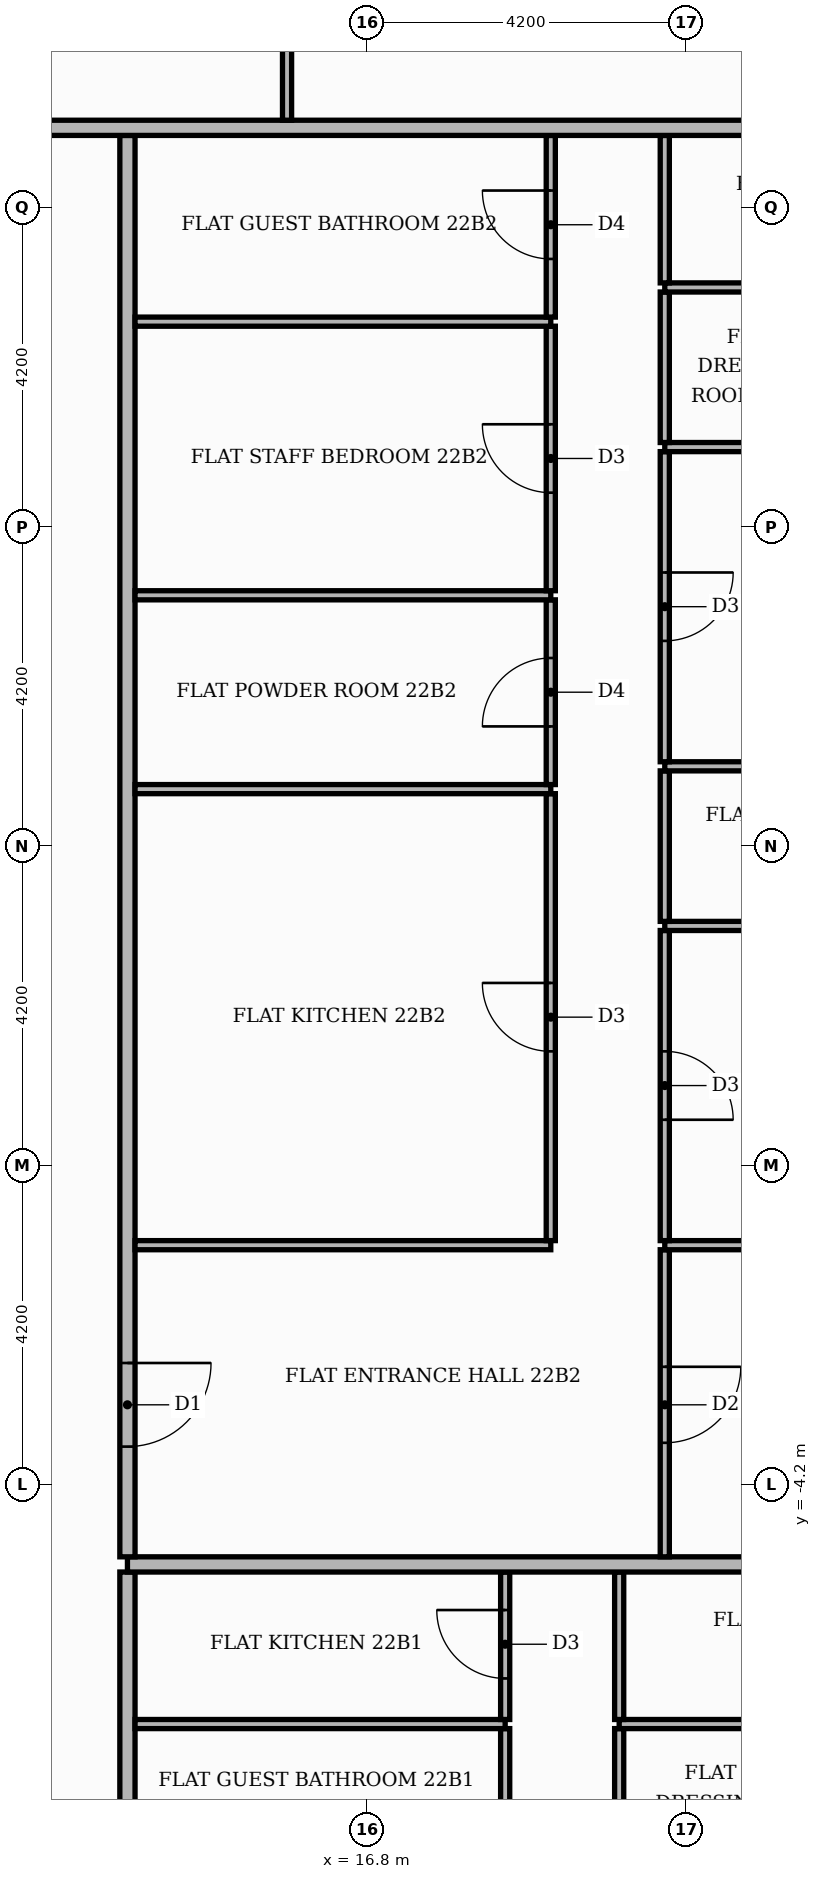
"""IFC4 building model, lengths in metres.
Left out: names, types, materials, properties, quantities, classifications, styles, units other than length and angle.
Written with IfcOpenShell. Run it as: python <this file> out.ifc"""

import sys

from ifc_helpers import new_model, si_unit, direction, frame, frame_2d, origin, place, context, subcontext, project, spatial, rectangle, extrude, element, fill, save


model = new_model("IFC4")
c1 = context("Model", 3, precision=1e-05, world=origin(), true_north=direction((0.0, 1.0)))
c2 = subcontext(c1, "Body", "Model", "MODEL_VIEW")
j1 = project(units=[si_unit("LENGTHUNIT", "METRE"), si_unit("PLANEANGLEUNIT", "RADIAN")], contexts=[c1])
p1 = place(None, origin())
s1 = spatial("IfcSite", under=j1, at=p1, CompositionType="ELEMENT")
p2 = place(p1, origin())
s2 = spatial("IfcBuilding", under=s1, at=p2, CompositionType="ELEMENT")
p3 = place(p2, frame((0.0, 0.0, 94.8)))
s3 = spatial("IfcBuildingStorey", under=s2, at=p3, CompositionType="ELEMENT", Elevation=94.8)
p4 = place(p3, frame((13.65, -13.55, 0.0), z_axis=(0.0, 0.0, 1.0), x_axis=(0.0, 1.0, 0.0)))
e1 = element("IfcWall", 1, at=p4, inside=s3, PredefinedType="PARTITIONING", context=c2, shape_type="SweptSolid", body=[
    extrude(rectangle(XDim=8.2, YDim=0.2, at=frame_2d((4.1, 0.0))), origin(), (0.0, 0.0, 1.0), 3.48),
])
p5 = place(p4, frame((1.45, 0.0, 0.0)))
e2 = element("IfcOpeningElement", 2, at=p5, cuts=e1, PredefinedType="OPENING", context=c2, shape_type="SweptSolid", body=[
    extrude(rectangle(XDim=1.1, YDim=2.4, at=frame_2d((0.55, 1.2))), frame((0.0, 0.11, 0.0), z_axis=(0.0, -1.0, 0.0), x_axis=(1.0, 0.0, 0.0)), (0.0, 0.0, 1.0), 0.22),
])
for number, where, z_axis, x_axis in (
    (3, (18.62, -9.39, 0.0), (0.0, 0.0, 1.0), (0.0, 1.0, 0.0)),
    (4, (20.12, -9.39, 0.0), (0.0, 0.0, 1.0), (0.0, 1.0, 0.0)),
):
    element("IfcWall", number, at=place(p3, frame(where, z_axis=z_axis, x_axis=x_axis)), inside=s3, PredefinedType="PARTITIONING", context=c2, shape_type="SweptSolid", body=[
        extrude(rectangle(XDim=1.98, YDim=0.12, at=frame_2d((0.99, 0.0))), origin(), (0.0, 0.0, 1.0), 3.48),
    ])
p6 = place(p3, frame((13.75, -7.35, 0.0), z_axis=(0.0, 0.0, 1.0), x_axis=(1.0, 0.0, 0.0)))
e5 = element("IfcWall", 5, at=p6, inside=s3, PredefinedType="PARTITIONING", context=c2, shape_type="SweptSolid", body=[
    extrude(rectangle(XDim=4.87, YDim=0.12, at=frame_2d((2.435, 0.0))), origin(), (0.0, 0.0, 1.0), 3.48),
])
p7 = place(p3, frame((20.12, -7.35, 0.0), z_axis=(0.0, 0.0, 1.0), x_axis=(1.0, 0.0, 0.0)))
e6 = element("IfcWall", 6, at=p7, inside=s3, PredefinedType="PARTITIONING", context=c2, shape_type="SweptSolid", body=[
    extrude(rectangle(XDim=5.3, YDim=0.12, at=frame_2d((2.65, 0.0))), origin(), (0.0, 0.0, 1.0), 3.48),
])
p8 = place(p7, frame((2.35, 0.0, 0.0)))
e7 = element("IfcOpeningElement", 7, at=p8, cuts=e6, PredefinedType="OPENING", context=c2, shape_type="SweptSolid", body=[
    extrude(rectangle(XDim=0.9, YDim=2.1, at=frame_2d((0.45, 1.05))), frame((0.0, 0.07, 0.0), z_axis=(0.0, -1.0, 0.0), x_axis=(1.0, 0.0, 0.0)), (0.0, 0.0, 1.0), 0.14),
])
p9 = place(p3, frame((18.62, -7.29, 0.0), z_axis=(0.0, 0.0, 1.0), x_axis=(0.0, 1.0, 0.0)))
e8 = element("IfcWall", 8, at=p9, inside=s3, PredefinedType="PARTITIONING", context=c2, shape_type="SweptSolid", body=[
    extrude(rectangle(XDim=1.94, YDim=0.12, at=frame_2d((0.97, 0.0))), origin(), (0.0, 0.0, 1.0), 3.48),
])
p10 = place(p9, frame((0.54, 0.0, 0.0)))
e9 = element("IfcOpeningElement", 9, at=p10, cuts=e8, PredefinedType="OPENING", context=c2, shape_type="SweptSolid", body=[
    extrude(rectangle(XDim=0.9, YDim=2.1, at=frame_2d((0.45, 1.05))), frame((0.0, 0.07, 0.0), z_axis=(0.0, -1.0, 0.0), x_axis=(1.0, 0.0, 0.0)), (0.0, 0.0, 1.0), 0.14),
])
p11 = place(p3, frame((20.12, -7.29, 0.0), z_axis=(0.0, 0.0, 1.0), x_axis=(0.0, 1.0, 0.0)))
e10 = element("IfcWall", 10, at=p11, inside=s3, PredefinedType="PARTITIONING", context=c2, shape_type="SweptSolid", body=[
    extrude(rectangle(XDim=1.94, YDim=0.12, at=frame_2d((0.97, 0.0))), origin(), (0.0, 0.0, 1.0), 3.48),
])
p12 = place(p3, frame((13.65, -5.25, 0.0), z_axis=(0.0, 0.0, 1.0), x_axis=(1.0, 0.0, 0.0)))
e11 = element("IfcWall", 11, at=p12, inside=s3, PredefinedType="PARTITIONING", context=c2, shape_type="SweptSolid", body=[
    extrude(rectangle(XDim=11.77, YDim=0.2, at=frame_2d((5.885, 0.0))), origin(), (0.0, 0.0, 1.0), 3.48),
])
p13 = place(p3, frame((13.65, -5.15, 0.0), z_axis=(0.0, 0.0, 1.0), x_axis=(0.0, 1.0, 0.0)))
e12 = element("IfcWall", 12, at=p13, inside=s3, PredefinedType="PARTITIONING", context=c2, shape_type="SweptSolid", body=[
    extrude(rectangle(XDim=18.7, YDim=0.2, at=frame_2d((9.35, 0.0))), origin(), (0.0, 0.0, 1.0), 3.48),
])
p14 = place(p13, frame((1.45, 0.0, 0.0)))
e13 = element("IfcOpeningElement", 13, at=p14, cuts=e12, PredefinedType="OPENING", context=c2, shape_type="SweptSolid", body=[
    extrude(rectangle(XDim=1.1, YDim=2.4, at=frame_2d((0.55, 1.2))), frame((0.0, 0.11, 0.0), z_axis=(0.0, -1.0, 0.0), x_axis=(1.0, 0.0, 0.0)), (0.0, 0.0, 1.0), 0.22),
])
p15 = place(p3, frame((20.72, -5.15, 0.0), z_axis=(0.0, 0.0, 1.0), x_axis=(0.0, 1.0, 0.0)))
e14 = element("IfcWall", 14, at=p15, inside=s3, PredefinedType="PARTITIONING", context=c2, shape_type="SweptSolid", body=[
    extrude(rectangle(XDim=4.04, YDim=0.12, at=frame_2d((2.02, 0.0))), origin(), (0.0, 0.0, 1.0), 3.48),
])
p16 = place(p15, frame((1.5, 0.0, 0.0)))
e15 = element("IfcOpeningElement", 15, at=p16, cuts=e14, PredefinedType="OPENING", context=c2, shape_type="SweptSolid", body=[
    extrude(rectangle(XDim=1.0, YDim=2.1, at=frame_2d((0.5, 1.05))), frame((0.0, 0.07, 0.0), z_axis=(0.0, -1.0, 0.0), x_axis=(1.0, 0.0, 0.0)), (0.0, 0.0, 1.0), 0.14),
])
p17 = place(p3, frame((13.75, -1.05, 0.0), z_axis=(0.0, 0.0, 1.0), x_axis=(1.0, 0.0, 0.0)))
e16 = element("IfcWall", 16, at=p17, inside=s3, PredefinedType="PARTITIONING", context=c2, shape_type="SweptSolid", body=[
    extrude(rectangle(XDim=5.47, YDim=0.12, at=frame_2d((2.735, 0.0))), origin(), (0.0, 0.0, 1.0), 3.48),
])
p18 = place(p3, frame((20.72, -1.05, 0.0), z_axis=(0.0, 0.0, 1.0), x_axis=(1.0, 0.0, 0.0)))
e17 = element("IfcWall", 17, at=p18, inside=s3, PredefinedType="PARTITIONING", context=c2, shape_type="SweptSolid", body=[
    extrude(rectangle(XDim=4.7, YDim=0.12, at=frame_2d((2.35, 0.0))), origin(), (0.0, 0.0, 1.0), 3.48),
])
p19 = place(p3, frame((19.22, -0.99, 0.0), z_axis=(0.0, 0.0, 1.0), x_axis=(0.0, 1.0, 0.0)))
e18 = element("IfcWall", 18, at=p19, inside=s3, PredefinedType="PARTITIONING", context=c2, shape_type="SweptSolid", body=[
    extrude(rectangle(XDim=5.88, YDim=0.12, at=frame_2d((2.94, 0.0))), origin(), (0.0, 0.0, 1.0), 3.48),
])
p20 = place(p19, frame((2.49, 0.0, 0.0)))
e19 = element("IfcOpeningElement", 19, at=p20, cuts=e18, PredefinedType="OPENING", context=c2, shape_type="SweptSolid", body=[
    extrude(rectangle(XDim=0.9, YDim=2.1, at=frame_2d((0.45, 1.05))), frame((0.0, 0.07, 0.0), z_axis=(0.0, -1.0, 0.0), x_axis=(1.0, 0.0, 0.0)), (0.0, 0.0, 1.0), 0.14),
])
p21 = place(p3, frame((20.72, -0.99, 0.0), z_axis=(0.0, 0.0, 1.0), x_axis=(0.0, 1.0, 0.0)))
e20 = element("IfcWall", 20, at=p21, inside=s3, PredefinedType="PARTITIONING", context=c2, shape_type="SweptSolid", body=[
    extrude(rectangle(XDim=4.08, YDim=0.12, at=frame_2d((2.04, 0.0))), origin(), (0.0, 0.0, 1.0), 3.48),
])
p22 = place(p21, frame((1.59, 0.0, 0.0)))
e21 = element("IfcOpeningElement", 21, at=p22, cuts=e20, PredefinedType="OPENING", context=c2, shape_type="SweptSolid", body=[
    extrude(rectangle(XDim=0.9, YDim=2.1, at=frame_2d((0.45, 1.05))), frame((0.0, 0.07, 0.0), z_axis=(0.0, -1.0, 0.0), x_axis=(1.0, 0.0, 0.0)), (0.0, 0.0, 1.0), 0.14),
])
p23 = place(p3, frame((20.72, 3.15, 0.0), z_axis=(0.0, 0.0, 1.0), x_axis=(1.0, 0.0, 0.0)))
e22 = element("IfcWall", 22, at=p23, inside=s3, PredefinedType="PARTITIONING", context=c2, shape_type="SweptSolid", body=[
    extrude(rectangle(XDim=4.7, YDim=0.12, at=frame_2d((2.35, 0.0))), origin(), (0.0, 0.0, 1.0), 3.48),
])
p24 = place(p23, frame((2.05, 0.0, 0.0)))
e23 = element("IfcOpeningElement", 23, at=p24, cuts=e22, PredefinedType="OPENING", context=c2, shape_type="SweptSolid", body=[
    extrude(rectangle(XDim=0.9, YDim=2.1, at=frame_2d((0.45, 1.05))), frame((0.0, 0.07, 0.0), z_axis=(0.0, -1.0, 0.0), x_axis=(1.0, 0.0, 0.0)), (0.0, 0.0, 1.0), 0.14),
])
p25 = place(p3, frame((20.72, 3.21, 0.0), z_axis=(0.0, 0.0, 1.0), x_axis=(0.0, 1.0, 0.0)))
e24 = element("IfcWall", 24, at=p25, inside=s3, PredefinedType="PARTITIONING", context=c2, shape_type="SweptSolid", body=[
    extrude(rectangle(XDim=1.98, YDim=0.12, at=frame_2d((0.99, 0.0))), origin(), (0.0, 0.0, 1.0), 3.48),
])
p26 = place(p3, frame((13.75, 4.95, 0.0), z_axis=(0.0, 0.0, 1.0), x_axis=(1.0, 0.0, 0.0)))
e25 = element("IfcWall", 25, at=p26, inside=s3, PredefinedType="PARTITIONING", context=c2, shape_type="SweptSolid", body=[
    extrude(rectangle(XDim=5.47, YDim=0.12, at=frame_2d((2.735, 0.0))), origin(), (0.0, 0.0, 1.0), 3.48),
])
p27 = place(p3, frame((19.22, 5.01, 0.0), z_axis=(0.0, 0.0, 1.0), x_axis=(0.0, 1.0, 0.0)))
e26 = element("IfcWall", 26, at=p27, inside=s3, PredefinedType="PARTITIONING", context=c2, shape_type="SweptSolid", body=[
    extrude(rectangle(XDim=2.43, YDim=0.12, at=frame_2d((1.215, 0.0))), origin(), (0.0, 0.0, 1.0), 3.48),
])
p28 = place(p27, frame((0.765, 0.0, 0.0)))
e27 = element("IfcOpeningElement", 27, at=p28, cuts=e26, PredefinedType="OPENING", context=c2, shape_type="SweptSolid", body=[
    extrude(rectangle(XDim=0.9, YDim=2.1, at=frame_2d((0.45, 1.05))), frame((0.0, 0.07, 0.0), z_axis=(0.0, -1.0, 0.0), x_axis=(1.0, 0.0, 0.0)), (0.0, 0.0, 1.0), 0.14),
])
p29 = place(p3, frame((20.72, 5.25, 0.0), z_axis=(0.0, 0.0, 1.0), x_axis=(1.0, 0.0, 0.0)))
e28 = element("IfcWall", 28, at=p29, inside=s3, PredefinedType="PARTITIONING", context=c2, shape_type="SweptSolid", body=[
    extrude(rectangle(XDim=4.7, YDim=0.12, at=frame_2d((2.35, 0.0))), origin(), (0.0, 0.0, 1.0), 3.48),
])
p30 = place(p3, frame((20.72, 5.31, 0.0), z_axis=(0.0, 0.0, 1.0), x_axis=(0.0, 1.0, 0.0)))
e29 = element("IfcWall", 29, at=p30, inside=s3, PredefinedType="PARTITIONING", context=c2, shape_type="SweptSolid", body=[
    extrude(rectangle(XDim=4.08, YDim=0.12, at=frame_2d((2.04, 0.0))), origin(), (0.0, 0.0, 1.0), 3.48),
])
p31 = place(p30, frame((1.59, 0.0, 0.0)))
e30 = element("IfcOpeningElement", 30, at=p31, cuts=e29, PredefinedType="OPENING", context=c2, shape_type="SweptSolid", body=[
    extrude(rectangle(XDim=0.9, YDim=2.1, at=frame_2d((0.45, 1.05))), frame((0.0, 0.07, 0.0), z_axis=(0.0, -1.0, 0.0), x_axis=(1.0, 0.0, 0.0)), (0.0, 0.0, 1.0), 0.14),
])
p32 = place(p3, frame((13.75, 7.5, 0.0), z_axis=(0.0, 0.0, 1.0), x_axis=(1.0, 0.0, 0.0)))
e31 = element("IfcWall", 31, at=p32, inside=s3, PredefinedType="PARTITIONING", context=c2, shape_type="SweptSolid", body=[
    extrude(rectangle(XDim=5.47, YDim=0.12, at=frame_2d((2.735, 0.0))), origin(), (0.0, 0.0, 1.0), 3.48),
])
p33 = place(p3, frame((19.22, 7.56, 0.0), z_axis=(0.0, 0.0, 1.0), x_axis=(0.0, 1.0, 0.0)))
e32 = element("IfcWall", 32, at=p33, inside=s3, PredefinedType="PARTITIONING", context=c2, shape_type="SweptSolid", body=[
    extrude(rectangle(XDim=3.48, YDim=0.12, at=frame_2d((1.74, 0.0))), origin(), (0.0, 0.0, 1.0), 3.48),
])
p34 = place(p33, frame((1.29, 0.0, 0.0)))
e33 = element("IfcOpeningElement", 33, at=p34, cuts=e32, PredefinedType="OPENING", context=c2, shape_type="SweptSolid", body=[
    extrude(rectangle(XDim=0.9, YDim=2.1, at=frame_2d((0.45, 1.05))), frame((0.0, 0.07, 0.0), z_axis=(0.0, -1.0, 0.0), x_axis=(1.0, 0.0, 0.0)), (0.0, 0.0, 1.0), 0.14),
])
p35 = place(p3, frame((20.72, 9.45, 0.0), z_axis=(0.0, 0.0, 1.0), x_axis=(1.0, 0.0, 0.0)))
e34 = element("IfcWall", 34, at=p35, inside=s3, PredefinedType="PARTITIONING", context=c2, shape_type="SweptSolid", body=[
    extrude(rectangle(XDim=4.7, YDim=0.12, at=frame_2d((2.35, 0.0))), origin(), (0.0, 0.0, 1.0), 3.48),
])
p36 = place(p35, frame((2.05, 0.0, 0.0)))
e35 = element("IfcOpeningElement", 35, at=p36, cuts=e34, PredefinedType="OPENING", context=c2, shape_type="SweptSolid", body=[
    extrude(rectangle(XDim=0.9, YDim=2.1, at=frame_2d((0.45, 1.05))), frame((0.0, 0.07, 0.0), z_axis=(0.0, -1.0, 0.0), x_axis=(1.0, 0.0, 0.0)), (0.0, 0.0, 1.0), 0.14),
])
p37 = place(p3, frame((20.72, 9.51, 0.0), z_axis=(0.0, 0.0, 1.0), x_axis=(0.0, 1.0, 0.0)))
e36 = element("IfcWall", 36, at=p37, inside=s3, PredefinedType="PARTITIONING", context=c2, shape_type="SweptSolid", body=[
    extrude(rectangle(XDim=1.98, YDim=0.12, at=frame_2d((0.99, 0.0))), origin(), (0.0, 0.0, 1.0), 3.48),
])
p38 = place(p3, frame((13.75, 11.1, 0.0), z_axis=(0.0, 0.0, 1.0), x_axis=(1.0, 0.0, 0.0)))
e37 = element("IfcWall", 37, at=p38, inside=s3, PredefinedType="PARTITIONING", context=c2, shape_type="SweptSolid", body=[
    extrude(rectangle(XDim=5.47, YDim=0.12, at=frame_2d((2.735, 0.0))), origin(), (0.0, 0.0, 1.0), 3.48),
])
p39 = place(p3, frame((19.22, 11.16, 0.0), z_axis=(0.0, 0.0, 1.0), x_axis=(0.0, 1.0, 0.0)))
e38 = element("IfcWall", 38, at=p39, inside=s3, PredefinedType="PARTITIONING", context=c2, shape_type="SweptSolid", body=[
    extrude(rectangle(XDim=2.39, YDim=0.12, at=frame_2d((1.195, 0.0))), origin(), (0.0, 0.0, 1.0), 3.48),
])
p40 = place(p39, frame((0.765, 0.0, 0.0)))
e39 = element("IfcOpeningElement", 39, at=p40, cuts=e38, PredefinedType="OPENING", context=c2, shape_type="SweptSolid", body=[
    extrude(rectangle(XDim=0.9, YDim=2.1, at=frame_2d((0.45, 1.05))), frame((0.0, 0.07, 0.0), z_axis=(0.0, -1.0, 0.0), x_axis=(1.0, 0.0, 0.0)), (0.0, 0.0, 1.0), 0.14),
])
p41 = place(p3, frame((20.72, 11.55, 0.0), z_axis=(0.0, 0.0, 1.0), x_axis=(1.0, 0.0, 0.0)))
e40 = element("IfcWall", 40, at=p41, inside=s3, PredefinedType="PARTITIONING", context=c2, shape_type="SweptSolid", body=[
    extrude(rectangle(XDim=4.7, YDim=0.12, at=frame_2d((2.35, 0.0))), origin(), (0.0, 0.0, 1.0), 3.48),
])
p42 = place(p41, frame((2.05, 0.0, 0.0)))
e41 = element("IfcOpeningElement", 41, at=p42, cuts=e40, PredefinedType="OPENING", context=c2, shape_type="SweptSolid", body=[
    extrude(rectangle(XDim=0.9, YDim=2.1, at=frame_2d((0.45, 1.05))), frame((0.0, 0.07, 0.0), z_axis=(0.0, -1.0, 0.0), x_axis=(1.0, 0.0, 0.0)), (0.0, 0.0, 1.0), 0.14),
])
p43 = place(p3, frame((20.72, 11.61, 0.0), z_axis=(0.0, 0.0, 1.0), x_axis=(0.0, 1.0, 0.0)))
e42 = element("IfcWall", 42, at=p43, inside=s3, PredefinedType="PARTITIONING", context=c2, shape_type="SweptSolid", body=[
    extrude(rectangle(XDim=1.94, YDim=0.12, at=frame_2d((0.97, 0.0))), origin(), (0.0, 0.0, 1.0), 3.48),
])
p44 = place(p3, frame((-13.65, 13.65, 0.0), z_axis=(0.0, 0.0, 1.0), x_axis=(1.0, 0.0, 0.0)))
e43 = element("IfcWall", 43, at=p44, inside=s3, PredefinedType="PARTITIONING", context=c2, shape_type="SweptSolid", body=[
    extrude(rectangle(XDim=39.07, YDim=0.2, at=frame_2d((19.535, 0.0))), origin(), (0.0, 0.0, 1.0), 3.48),
])
p45 = place(p44, frame((24.65, 0.0, 0.0)))
e44 = element("IfcOpeningElement", 44, at=p45, cuts=e43, PredefinedType="OPENING", context=c2, shape_type="SweptSolid", body=[
    extrude(rectangle(XDim=1.1, YDim=2.4, at=frame_2d((0.55, 1.2))), frame((0.0, 0.11, 0.0), z_axis=(0.0, -1.0, 0.0), x_axis=(1.0, 0.0, 0.0)), (0.0, 0.0, 1.0), 0.22),
])
p46 = place(p44, frame((16.25, 0.0, 0.0)))
e45 = element("IfcOpeningElement", 45, at=p46, cuts=e43, PredefinedType="OPENING", context=c2, shape_type="SweptSolid", body=[
    extrude(rectangle(XDim=1.1, YDim=2.4, at=frame_2d((0.55, 1.2))), frame((0.0, 0.11, 0.0), z_axis=(0.0, -1.0, 0.0), x_axis=(1.0, 0.0, 0.0)), (0.0, 0.0, 1.0), 0.22),
])
p47 = place(p3, frame((15.75, 13.75, 0.0), z_axis=(0.0, 0.0, 1.0), x_axis=(0.0, 1.0, 0.0)))
e46 = element("IfcWall", 46, at=p47, inside=s3, PredefinedType="PARTITIONING", context=c2, shape_type="SweptSolid", body=[
    extrude(rectangle(XDim=6.61, YDim=0.12, at=frame_2d((3.305, 0.0))), origin(), (0.0, 0.0, 1.0), 3.48),
])
p48 = place(p47, frame((2.785, 0.0, 0.0)))
e47 = element("IfcOpeningElement", 47, at=p48, cuts=e46, PredefinedType="OPENING", context=c2, shape_type="SweptSolid", body=[
    extrude(rectangle(XDim=1.0, YDim=2.1, at=frame_2d((0.5, 1.05))), frame((0.0, 0.07, 0.0), z_axis=(0.0, -1.0, 0.0), x_axis=(1.0, 0.0, 0.0)), (0.0, 0.0, 1.0), 0.14),
])
p49 = place(p10, origin())
e48 = element("IfcDoor", 48, at=p49, inside=s3, OperationType="SINGLE_SWING_RIGHT", PredefinedType="DOOR", context=c2, shape_type="SweptSolid", body=[
    extrude(rectangle(XDim=0.9, YDim=2.1, at=frame_2d((0.45, 1.05))), frame((0.0, 0.025, 0.0), z_axis=(0.0, -1.0, 0.0), x_axis=(1.0, 0.0, 0.0)), (0.0, 0.0, 1.0), 0.05),
])
fill(e9, e48)
p50 = place(p14, frame((1.1, 0.0, 0.0), z_axis=(0.0, 0.0, 1.0), x_axis=(-1.0, 0.0, 0.0)))
e49 = element("IfcDoor", 49, at=p50, inside=s3, OperationType="SINGLE_SWING_RIGHT", PredefinedType="DOOR", context=c2, shape_type="SweptSolid", body=[
    extrude(rectangle(XDim=1.1, YDim=2.4, at=frame_2d((0.55, 1.2))), frame((0.0, 0.025, 0.0), z_axis=(0.0, -1.0, 0.0), x_axis=(1.0, 0.0, 0.0)), (0.0, 0.0, 1.0), 0.05),
])
fill(e13, e49)
p51 = place(p20, origin())
e50 = element("IfcDoor", 50, at=p51, inside=s3, OperationType="SINGLE_SWING_RIGHT", PredefinedType="DOOR", context=c2, shape_type="SweptSolid", body=[
    extrude(rectangle(XDim=0.9, YDim=2.1, at=frame_2d((0.45, 1.05))), frame((0.0, 0.025, 0.0), z_axis=(0.0, -1.0, 0.0), x_axis=(1.0, 0.0, 0.0)), (0.0, 0.0, 1.0), 0.05),
])
fill(e19, e50)
p52 = place(p28, origin())
e51 = element("IfcDoor", 51, at=p52, inside=s3, OperationType="SINGLE_SWING_LEFT", PredefinedType="DOOR", context=c2, shape_type="SweptSolid", body=[
    extrude(rectangle(XDim=0.9, YDim=2.1, at=frame_2d((0.45, 1.05))), frame((0.0, 0.025, 0.0), z_axis=(0.0, -1.0, 0.0), x_axis=(1.0, 0.0, 0.0)), (0.0, 0.0, 1.0), 0.05),
])
fill(e27, e51)
p53 = place(p34, origin())
e52 = element("IfcDoor", 52, at=p53, inside=s3, OperationType="SINGLE_SWING_RIGHT", PredefinedType="DOOR", context=c2, shape_type="SweptSolid", body=[
    extrude(rectangle(XDim=0.9, YDim=2.1, at=frame_2d((0.45, 1.05))), frame((0.0, 0.025, 0.0), z_axis=(0.0, -1.0, 0.0), x_axis=(1.0, 0.0, 0.0)), (0.0, 0.0, 1.0), 0.05),
])
fill(e33, e52)
p54 = place(p40, origin())
e53 = element("IfcDoor", 53, at=p54, inside=s3, OperationType="SINGLE_SWING_RIGHT", PredefinedType="DOOR", context=c2, shape_type="SweptSolid", body=[
    extrude(rectangle(XDim=0.9, YDim=2.1, at=frame_2d((0.45, 1.05))), frame((0.0, 0.025, 0.0), z_axis=(0.0, -1.0, 0.0), x_axis=(1.0, 0.0, 0.0)), (0.0, 0.0, 1.0), 0.05),
])
fill(e39, e53)
p55 = place(p16, frame((1.0, 0.0, 0.0), z_axis=(0.0, 0.0, 1.0), x_axis=(-1.0, 0.0, 0.0)))
e54 = element("IfcDoor", 54, at=p55, inside=s3, OperationType="SINGLE_SWING_RIGHT", PredefinedType="DOOR", context=c2, shape_type="SweptSolid", body=[
    extrude(rectangle(XDim=1.0, YDim=2.1, at=frame_2d((0.5, 1.05))), frame((0.0, 0.025, 0.0), z_axis=(0.0, -1.0, 0.0), x_axis=(1.0, 0.0, 0.0)), (0.0, 0.0, 1.0), 0.05),
])
fill(e15, e54)
p56 = place(p22, frame((0.9, 0.0, 0.0), z_axis=(0.0, 0.0, 1.0), x_axis=(-1.0, 0.0, 0.0)))
e55 = element("IfcDoor", 55, at=p56, inside=s3, OperationType="SINGLE_SWING_LEFT", PredefinedType="DOOR", context=c2, shape_type="SweptSolid", body=[
    extrude(rectangle(XDim=0.9, YDim=2.1, at=frame_2d((0.45, 1.05))), frame((0.0, 0.025, 0.0), z_axis=(0.0, -1.0, 0.0), x_axis=(1.0, 0.0, 0.0)), (0.0, 0.0, 1.0), 0.05),
])
fill(e21, e55)
p57 = place(p31, frame((0.9, 0.0, 0.0), z_axis=(0.0, 0.0, 1.0), x_axis=(-1.0, 0.0, 0.0)))
e56 = element("IfcDoor", 56, at=p57, inside=s3, OperationType="SINGLE_SWING_RIGHT", PredefinedType="DOOR", context=c2, shape_type="SweptSolid", body=[
    extrude(rectangle(XDim=0.9, YDim=2.1, at=frame_2d((0.45, 1.05))), frame((0.0, 0.025, 0.0), z_axis=(0.0, -1.0, 0.0), x_axis=(1.0, 0.0, 0.0)), (0.0, 0.0, 1.0), 0.05),
])
fill(e30, e56)
save(model, sys.argv[1])
